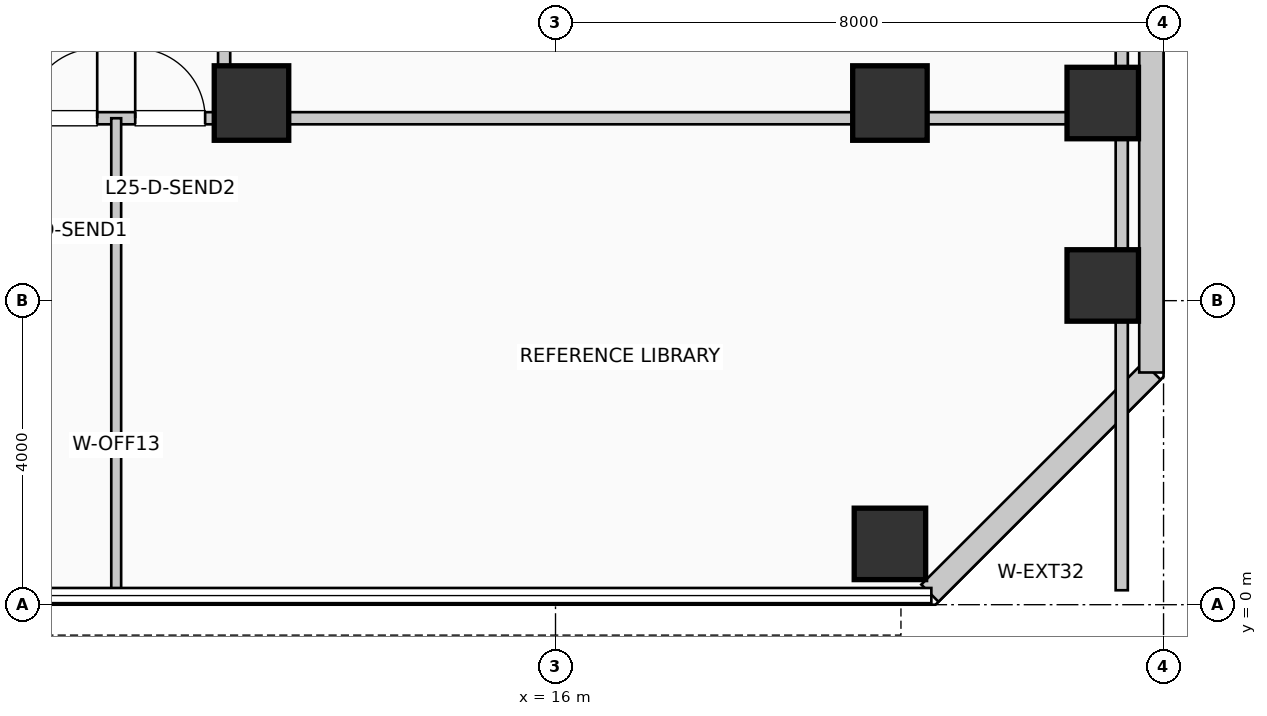
"""IFC4 building model, lengths in metres.
Left out: names, types, materials, properties, quantities, classifications, styles, units other than length and angle.
Written with IfcOpenShell. Run it as: python <this file> out.ifc"""

import sys

from ifc_helpers import new_model, si_unit, direction, frame, frame_2d, origin, origin_2d, place, context, subcontext, project, spatial, rectangle, extrude, element, fill, save


model = new_model("IFC4")
c1 = context("Model", 3, precision=1e-05, world=origin(), true_north=direction((0.0, 1.0)))
c2 = subcontext(c1, "Body", "Model", "MODEL_VIEW")
j1 = project(units=[si_unit("LENGTHUNIT", "METRE"), si_unit("PLANEANGLEUNIT", "RADIAN")], contexts=[c1])
p1 = place(None, origin())
s1 = spatial("IfcSite", under=j1, at=p1, CompositionType="ELEMENT")
p2 = place(p1, origin())
s2 = spatial("IfcBuilding", under=s1, at=p2, CompositionType="ELEMENT")
p3 = place(p2, frame((0.0, 0.0, 106.59)))
s3 = spatial("IfcBuildingStorey", under=s2, at=p3, CompositionType="ELEMENT", Elevation=106.59)
p4 = place(p3, frame((12.0, 6.6, 0.0), z_axis=(0.0, 0.0, 1.0), x_axis=(1.0, 0.0, 0.0)))
e1 = element("IfcColumn", 1, at=p4, inside=s3, PredefinedType="COLUMN", context=c2, shape_type="SweptSolid", body=[
    extrude(rectangle(XDim=0.98, YDim=0.98, at=origin_2d()), origin(), (0.0, 0.0, 1.0), 3.96),
])
p5 = place(p3, frame((20.4, 0.8, 0.0), z_axis=(0.0, 0.0, 1.0), x_axis=(1.0, 0.0, 0.0)))
e2 = element("IfcColumn", 2, at=p5, inside=s3, PredefinedType="COLUMN", context=c2, shape_type="SweptSolid", body=[
    extrude(rectangle(XDim=0.94, YDim=0.94, at=origin_2d()), origin(), (0.0, 0.0, 1.0), 3.96),
])
p6 = place(p3, frame((20.4, 6.6, 0.0), z_axis=(0.0, 0.0, 1.0), x_axis=(1.0, 0.0, 0.0)))
e3 = element("IfcColumn", 3, at=p6, inside=s3, PredefinedType="COLUMN", context=c2, shape_type="SweptSolid", body=[
    extrude(rectangle(XDim=0.98, YDim=0.98, at=origin_2d()), origin(), (0.0, 0.0, 1.0), 3.96),
])
for number, where, z_axis, x_axis in (
    (4, (23.2, 4.2, 0.0), (0.0, 0.0, 1.0), (1.0, 0.0, 0.0)),
    (5, (23.2, 6.6, 0.0), (0.0, 0.0, 1.0), (1.0, 0.0, 0.0)),
):
    element("IfcColumn", number, at=place(p3, frame(where, z_axis=z_axis, x_axis=x_axis)), inside=s3, PredefinedType="COLUMN", context=c2, shape_type="SweptSolid", body=[
        extrude(rectangle(XDim=0.94, YDim=0.94, at=origin_2d()), origin(), (0.0, 0.0, 1.0), 3.96),
    ])
p7 = place(p3, frame((20.926, 0.152, 0.0), z_axis=(0.0, 0.0, 1.0), x_axis=(0.707106781187, 0.707106781187, 0.0)))
e6 = element("IfcWall", 6, at=p7, inside=s3, PredefinedType="SOLIDWALL", context=c2, shape_type="SweptSolid", body=[
    extrude(rectangle(XDim=4.133, YDim=0.32, at=frame_2d((2.066, 0.0))), origin(), (0.0, 0.0, 1.0), 3.71),
])
p8 = place(p3, frame((23.84, 3.055, 0.0), z_axis=(0.0, 0.0, 1.0), x_axis=(0.0, 1.0, 0.0)))
e7 = element("IfcWall", 7, at=p8, inside=s3, PredefinedType="SOLIDWALL", context=c2, shape_type="SweptSolid", body=[
    extrude(rectangle(XDim=12.89, YDim=0.32, at=frame_2d((6.445, 0.0))), origin(), (0.0, 0.0, 1.0), 3.71),
])
p9 = place(p3, frame((11.64, 6.4, 0.0), z_axis=(0.0, 0.0, 1.0), x_axis=(0.0, 1.0, 0.0)))
e8 = element("IfcWall", 8, at=p9, inside=s3, PredefinedType="PARTITIONING", context=c2, shape_type="SweptSolid", body=[
    extrude(rectangle(XDim=23.0, YDim=0.16, at=frame_2d((11.5, 0.0))), origin(), (0.0, 0.0, 1.0), 2.995),
])
p10 = place(p9, frame((4.275, 0.0, 0.0)))
e9 = element("IfcOpeningElement", 9, at=p10, cuts=e8, PredefinedType="OPENING", context=c2, shape_type="SweptSolid", body=[
    extrude(rectangle(XDim=0.95, YDim=2.15, at=frame_2d((0.475, 1.075))), frame((0.0, 0.09, 0.0), z_axis=(0.0, -1.0, 0.0), x_axis=(1.0, 0.0, 0.0)), (0.0, 0.0, 1.0), 0.18),
])
p11 = place(p9, frame((17.775, 0.0, 0.0)))
e10 = element("IfcOpeningElement", 10, at=p11, cuts=e8, PredefinedType="OPENING", context=c2, shape_type="SweptSolid", body=[
    extrude(rectangle(XDim=0.95, YDim=2.15, at=frame_2d((0.475, 1.075))), frame((0.0, 0.09, 0.0), z_axis=(0.0, -1.0, 0.0), x_axis=(1.0, 0.0, 0.0)), (0.0, 0.0, 1.0), 0.18),
])
p12 = place(p3, frame((0.19, 6.4, 0.0), z_axis=(0.0, 0.0, 1.0), x_axis=(1.0, 0.0, 0.0)))
e11 = element("IfcWall", 11, at=p12, inside=s3, PredefinedType="PARTITIONING", context=c2, shape_type="SweptSolid", body=[
    extrude(rectangle(XDim=23.26, YDim=0.16, at=frame_2d((11.63, 0.0))), origin(), (0.0, 0.0, 1.0), 2.995),
])
p13 = place(p12, frame((8.86, 0.0, 0.0)))
e12 = element("IfcOpeningElement", 12, at=p13, cuts=e11, PredefinedType="OPENING", context=c2, shape_type="SweptSolid", body=[
    extrude(rectangle(XDim=0.92, YDim=2.1, at=frame_2d((0.46, 1.05))), frame((0.0, 0.09, 0.0), z_axis=(0.0, -1.0, 0.0), x_axis=(1.0, 0.0, 0.0)), (0.0, 0.0, 1.0), 0.18),
])
p14 = place(p12, frame((10.28, 0.0, 0.0)))
e13 = element("IfcOpeningElement", 13, at=p14, cuts=e11, PredefinedType="OPENING", context=c2, shape_type="SweptSolid", body=[
    extrude(rectangle(XDim=0.92, YDim=2.1, at=frame_2d((0.46, 1.05))), frame((0.0, 0.09, 0.0), z_axis=(0.0, -1.0, 0.0), x_axis=(1.0, 0.0, 0.0)), (0.0, 0.0, 1.0), 0.18),
])
p15 = place(p3, frame((23.45, 0.19, 0.0), z_axis=(0.0, 0.0, 1.0), x_axis=(0.0, 1.0, 0.0)))
e14 = element("IfcWall", 14, at=p15, inside=s3, PredefinedType="PARTITIONING", context=c2, shape_type="SweptSolid", body=[
    extrude(rectangle(XDim=29.21, YDim=0.16, at=frame_2d((14.605, 0.0))), origin(), (0.0, 0.0, 1.0), 2.995),
])
p16 = place(p3, frame((10.22, 0.19, 0.0), z_axis=(0.0, 0.0, 1.0), x_axis=(0.0, 1.0, 0.0)))
e15 = element("IfcWall", 15, at=p16, inside=s3, PredefinedType="PARTITIONING", context=c2, shape_type="SweptSolid", body=[
    extrude(rectangle(XDim=6.21, YDim=0.13, at=frame_2d((3.105, 0.0))), origin(), (0.0, 0.0, 1.0), 3.71),
])
p17 = place(p13, origin())
e16 = element("IfcDoor", 16, at=p17, inside=s3, OperationType="SINGLE_SWING_RIGHT", PredefinedType="DOOR", context=c2, shape_type="SweptSolid", body=[
    extrude(rectangle(XDim=0.92, YDim=2.1, at=frame_2d((0.46, 1.05))), frame((0.0, 0.025, 0.0), z_axis=(0.0, -1.0, 0.0), x_axis=(1.0, 0.0, 0.0)), (0.0, 0.0, 1.0), 0.05),
])
fill(e12, e16)
p18 = place(p14, origin())
e17 = element("IfcDoor", 17, at=p18, inside=s3, OperationType="SINGLE_SWING_LEFT", PredefinedType="DOOR", context=c2, shape_type="SweptSolid", body=[
    extrude(rectangle(XDim=0.92, YDim=2.1, at=frame_2d((0.46, 1.05))), frame((0.0, 0.025, 0.0), z_axis=(0.0, -1.0, 0.0), x_axis=(1.0, 0.0, 0.0)), (0.0, 0.0, 1.0), 0.05),
])
fill(e13, e17)
save(model, sys.argv[1])
